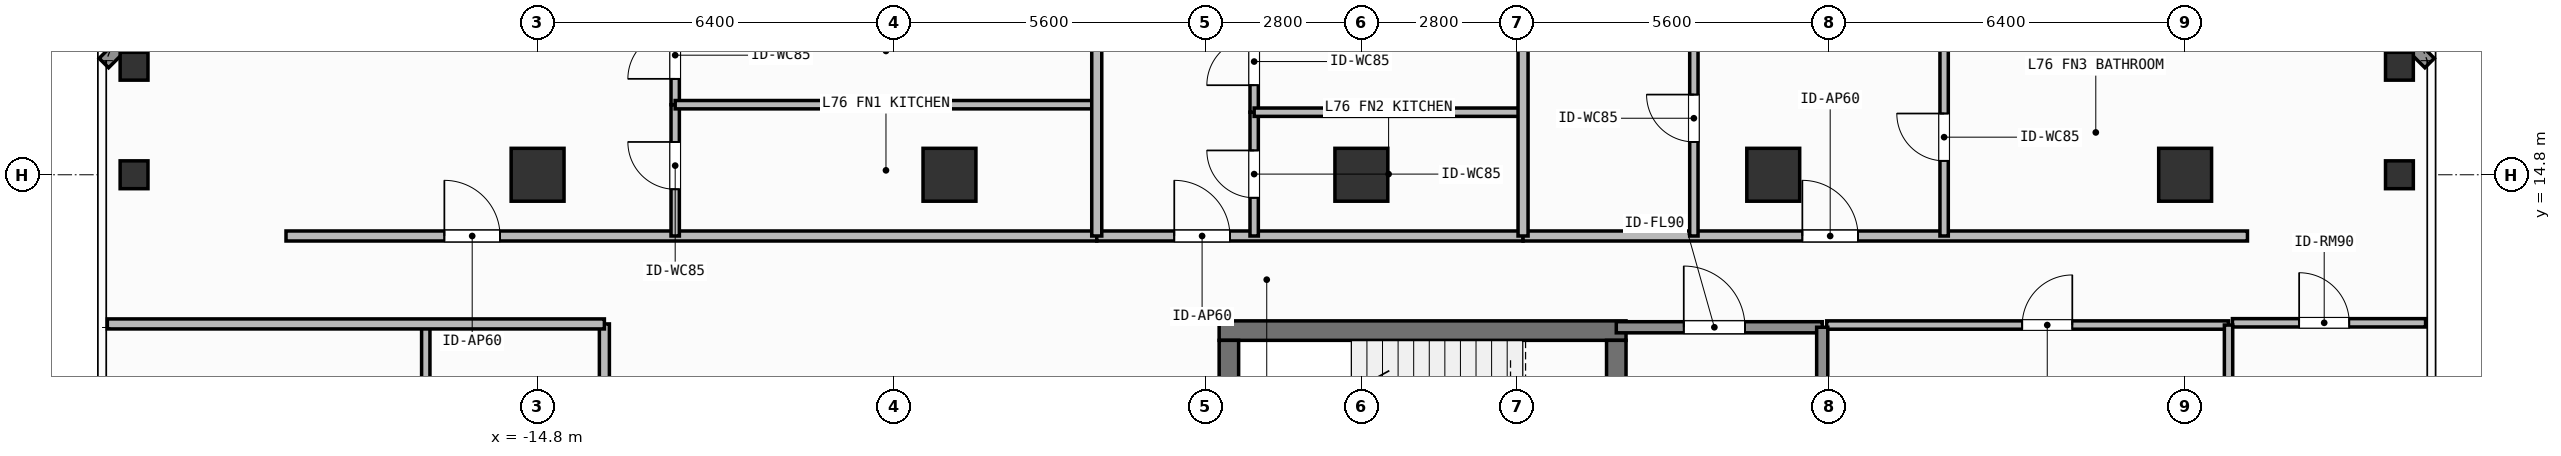
"""IFC4 building model, lengths in metres.
Left out: names, types, materials, properties, quantities, classifications, styles, units other than length and angle.
Written with IfcOpenShell. Run it as: python <this file> out.ifc"""

import sys

from ifc_helpers import new_model, si_unit, direction, frame, frame_2d, origin, origin_2d, place, context, subcontext, project, spatial, rectangle, hollow_rectangle, extrude, element, fill, save


model = new_model("IFC4")
c1 = context("Model", 3, precision=1e-05, world=origin(), true_north=direction((0.0, 1.0)))
c2 = subcontext(c1, "Body", "Model", "MODEL_VIEW")
j1 = project(units=[si_unit("LENGTHUNIT", "METRE"), si_unit("PLANEANGLEUNIT", "RADIAN")], contexts=[c1])
p1 = place(None, origin())
s1 = spatial("IfcSite", under=j1, at=p1, CompositionType="ELEMENT")
p2 = place(p1, origin())
s2 = spatial("IfcBuilding", under=s1, at=p2, CompositionType="ELEMENT")
p3 = place(p2, frame((0.0, 0.0, 309.3)))
s3 = spatial("IfcBuildingStorey", under=s2, at=p3, CompositionType="ELEMENT", Elevation=309.3)
p4 = place(p3, frame((-2.555, 12.0, 0.0), z_axis=(0.0, 0.0, 1.0), x_axis=(1.0, 0.0, 0.0)))
e1 = element("IfcWall", 1, at=p4, inside=s3, PredefinedType="SHEAR", context=c2, shape_type="SweptSolid", body=[
    extrude(rectangle(XDim=7.31, YDim=0.35, at=frame_2d((3.655, 0.0))), origin(), (0.0, 0.0, 1.0), 3.9),
])
p5 = place(p3, frame((-2.38, 8.9, 0.0), z_axis=(0.0, 0.0, 1.0), x_axis=(0.0, 1.0, 0.0)))
e2 = element("IfcWall", 2, at=p5, inside=s3, PredefinedType="SHEAR", context=c2, shape_type="SweptSolid", body=[
    extrude(rectangle(XDim=2.925, YDim=0.35, at=frame_2d((1.462, 0.0))), origin(), (0.0, 0.0, 1.0), 3.9),
])
p6 = place(p3, frame((4.58, 11.825, 0.0), z_axis=(0.0, 0.0, 1.0), x_axis=(0.0, -1.0, 0.0)))
e3 = element("IfcWall", 3, at=p6, inside=s3, PredefinedType="SHEAR", context=c2, shape_type="SweptSolid", body=[
    extrude(rectangle(XDim=2.925, YDim=0.35, at=frame_2d((1.462, 0.0))), origin(), (0.0, 0.0, 1.0), 3.9),
])
p7 = place(p6, frame((0.913, 0.0, 0.0)))
e4 = element("IfcOpeningElement", 4, at=p7, cuts=e3, PredefinedType="OPENING", context=c2, shape_type="SweptSolid", body=[
    extrude(rectangle(XDim=1.1, YDim=2.15, at=frame_2d((0.55, 1.075))), frame((0.0, 0.185, 0.0), z_axis=(0.0, -1.0, 0.0), x_axis=(1.0, 0.0, 0.0)), (0.0, 0.0, 1.0), 0.37),
])
for number, where, z_axis, x_axis in (
    (5, (-14.8, 14.8, 0.0), (0.0, 0.0, 1.0), (1.0, 0.0, 0.0)),
    (6, (-7.4, 14.8, 0.0), (0.0, 0.0, 1.0), (1.0, 0.0, 0.0)),
    (7, (0.0, 14.8, 0.0), (0.0, 0.0, 1.0), (1.0, 0.0, 0.0)),
    (8, (7.4, 14.8, 0.0), (0.0, 0.0, 1.0), (1.0, 0.0, 0.0)),
    (9, (14.8, 14.8, 0.0), (0.0, 0.0, 1.0), (1.0, 0.0, 0.0)),
):
    element("IfcColumn", number, at=place(p3, frame(where, z_axis=z_axis, x_axis=x_axis)), inside=s3, PredefinedType="COLUMN", context=c2, shape_type="SweptSolid", body=[
        extrude(rectangle(XDim=0.95, YDim=0.95, at=origin_2d()), origin(), (0.0, 0.0, 1.0), 3.9),
    ])
for number, where, z_axis, x_axis in (
    (10, (-22.05, 16.75, 0.0), (0.0, 0.0, 1.0), (1.0, 0.0, 0.0)),
    (11, (18.65, 16.75, 0.0), (0.0, 0.0, 1.0), (1.0, 0.0, 0.0)),
    (12, (-22.05, 14.8, 0.0), (0.0, 0.0, 1.0), (1.0, 0.0, 0.0)),
    (13, (18.65, 14.8, 0.0), (0.0, 0.0, 1.0), (1.0, 0.0, 0.0)),
):
    element("IfcColumn", number, at=place(p3, frame(where, z_axis=z_axis, x_axis=x_axis)), inside=s3, PredefinedType="COLUMN", context=c2, shape_type="SweptSolid", body=[
        extrude(hollow_rectangle(XDim=0.5, YDim=0.5, WallThickness=0.025, at=origin_2d()), origin(), (0.0, 0.0, 1.0), 3.9),
    ])
p8 = place(p3, frame((-22.592, 16.808, 0.0), z_axis=(0.0, 0.0, 1.0), x_axis=(0.707106781187, 0.707106781187, 0.0)))
e14 = element("IfcWall", 14, at=p8, inside=s3, PredefinedType="SOLIDWALL", context=c2, shape_type="SweptSolid", body=[
    extrude(rectangle(XDim=6.059, YDim=0.24, at=frame_2d((3.03, 0.0))), origin(), (0.0, 0.0, 1.0), 3.64),
])
p9 = place(p8, frame((2.28, 0.0, 0.8)))
e15 = element("IfcOpeningElement", 15, at=p9, cuts=e14, PredefinedType="OPENING", context=c2, shape_type="SweptSolid", body=[
    extrude(rectangle(XDim=1.5, YDim=1.85, at=frame_2d((0.75, 0.925))), frame((0.0, 0.13, 0.0), z_axis=(0.0, -1.0, 0.0), x_axis=(1.0, 0.0, 0.0)), (0.0, 0.0, 1.0), 0.26),
])
p10 = place(p3, frame((14.908, 21.092, 0.0), z_axis=(0.0, 0.0, 1.0), x_axis=(0.707106781187, -0.707106781187, 0.0)))
e16 = element("IfcWall", 16, at=p10, inside=s3, PredefinedType="SOLIDWALL", context=c2, shape_type="SweptSolid", body=[
    extrude(rectangle(XDim=6.059, YDim=0.24, at=frame_2d((3.03, 0.0))), origin(), (0.0, 0.0, 1.0), 3.64),
])
p11 = place(p10, frame((2.28, 0.0, 0.8)))
e17 = element("IfcOpeningElement", 17, at=p11, cuts=e16, PredefinedType="OPENING", context=c2, shape_type="SweptSolid", body=[
    extrude(rectangle(XDim=1.5, YDim=1.85, at=frame_2d((0.75, 0.925))), frame((0.0, 0.13, 0.0), z_axis=(0.0, -1.0, 0.0), x_axis=(1.0, 0.0, 0.0)), (0.0, 0.0, 1.0), 0.26),
])
p12 = place(p3, frame((4.58, 12.06, 0.0), z_axis=(0.0, 0.0, 1.0), x_axis=(1.0, 0.0, 0.0)))
e18 = element("IfcWall", 18, at=p12, inside=s3, PredefinedType="SOLIDWALL", context=c2, shape_type="SweptSolid", body=[
    extrude(rectangle(XDim=3.7, YDim=0.2, at=frame_2d((1.85, 0.0))), origin(), (0.0, 0.0, 1.0), 3.64),
])
p13 = place(p12, frame((1.212, 0.0, 0.0)))
e19 = element("IfcOpeningElement", 19, at=p13, cuts=e18, PredefinedType="OPENING", context=c2, shape_type="SweptSolid", body=[
    extrude(rectangle(XDim=1.1, YDim=2.15, at=frame_2d((0.55, 1.075))), frame((0.0, 0.11, 0.0), z_axis=(0.0, -1.0, 0.0), x_axis=(1.0, 0.0, 0.0)), (0.0, 0.0, 1.0), 0.22),
])
p14 = place(p3, frame((8.36, 12.1, 0.0), z_axis=(0.0, 0.0, 1.0), x_axis=(1.0, 0.0, 0.0)))
e20 = element("IfcWall", 20, at=p14, inside=s3, PredefinedType="PARTITIONING", context=c2, shape_type="SweptSolid", body=[
    extrude(rectangle(XDim=7.22, YDim=0.15, at=frame_2d((3.61, 0.0))), origin(), (0.0, 0.0, 1.0), 3.64),
])
p15 = place(p14, frame((3.513, 0.0, 0.0)))
e21 = element("IfcOpeningElement", 21, at=p15, cuts=e20, PredefinedType="OPENING", context=c2, shape_type="SweptSolid", body=[
    extrude(rectangle(XDim=0.9, YDim=2.1, at=frame_2d((0.45, 1.05))), frame((0.0, 0.085, 0.0), z_axis=(0.0, -1.0, 0.0), x_axis=(1.0, 0.0, 0.0)), (0.0, 0.0, 1.0), 0.17),
])
p16 = place(p3, frame((-19.32, 13.7, 0.0), z_axis=(0.0, 0.0, 1.0), x_axis=(1.0, 0.0, 0.0)))
e22 = element("IfcWall", 22, at=p16, inside=s3, PredefinedType="PARTITIONING", context=c2, shape_type="SweptSolid", body=[
    extrude(rectangle(XDim=14.566, YDim=0.18, at=frame_2d((7.283, 0.0))), origin(), (0.0, 0.0, 1.0), 3.64),
])
p17 = place(p16, frame((2.845, 0.0, 0.0)))
e23 = element("IfcOpeningElement", 23, at=p17, cuts=e22, PredefinedType="OPENING", context=c2, shape_type="SweptSolid", body=[
    extrude(rectangle(XDim=1.0, YDim=2.2, at=frame_2d((0.5, 1.1))), frame((0.0, 0.1, 0.0), z_axis=(0.0, -1.0, 0.0), x_axis=(1.0, 0.0, 0.0)), (0.0, 0.0, 1.0), 0.2),
])
p18 = place(p3, frame((-12.328, 13.7, 0.0), z_axis=(0.0, 0.0, 1.0), x_axis=(0.0, 1.0, 0.0)))
e24 = element("IfcWall", 24, at=p18, inside=s3, PredefinedType="PARTITIONING", context=c2, shape_type="SweptSolid", body=[
    extrude(rectangle(XDim=2.359, YDim=0.15, at=frame_2d((1.18, 0.0))), origin(), (0.0, 0.0, 1.0), 3.64),
])
p19 = place(p18, frame((0.839, 0.0, 0.0)))
e25 = element("IfcOpeningElement", 25, at=p19, cuts=e24, PredefinedType="OPENING", context=c2, shape_type="SweptSolid", body=[
    extrude(rectangle(XDim=0.85, YDim=2.1, at=frame_2d((0.425, 1.05))), frame((0.0, 0.085, 0.0), z_axis=(0.0, -1.0, 0.0), x_axis=(1.0, 0.0, 0.0)), (0.0, 0.0, 1.0), 0.17),
])
p20 = place(p3, frame((-12.328, 16.059, 0.0), z_axis=(0.0, 0.0, 1.0), x_axis=(0.0, 1.0, 0.0)))
e26 = element("IfcWall", 26, at=p20, inside=s3, PredefinedType="PARTITIONING", context=c2, shape_type="SweptSolid", body=[
    extrude(rectangle(XDim=1.931, YDim=0.15, at=frame_2d((0.965, 0.0))), origin(), (0.0, 0.0, 1.0), 3.64),
])
p21 = place(p20, frame((0.464, 0.0, 0.0)))
e27 = element("IfcOpeningElement", 27, at=p21, cuts=e26, PredefinedType="OPENING", context=c2, shape_type="SweptSolid", body=[
    extrude(rectangle(XDim=0.85, YDim=2.1, at=frame_2d((0.425, 1.05))), frame((0.0, 0.085, 0.0), z_axis=(0.0, -1.0, 0.0), x_axis=(1.0, 0.0, 0.0)), (0.0, 0.0, 1.0), 0.17),
])
p22 = place(p3, frame((-4.754, 13.7, 0.0), z_axis=(0.0, 0.0, 1.0), x_axis=(1.0, 0.0, 0.0)))
e28 = element("IfcWall", 28, at=p22, inside=s3, PredefinedType="PARTITIONING", context=c2, shape_type="SweptSolid", body=[
    extrude(rectangle(XDim=7.659, YDim=0.18, at=frame_2d((3.83, 0.0))), origin(), (0.0, 0.0, 1.0), 3.64),
])
p23 = place(p22, frame((1.393, 0.0, 0.0)))
e29 = element("IfcOpeningElement", 29, at=p23, cuts=e28, PredefinedType="OPENING", context=c2, shape_type="SweptSolid", body=[
    extrude(rectangle(XDim=1.0, YDim=2.2, at=frame_2d((0.5, 1.1))), frame((0.0, 0.1, 0.0), z_axis=(0.0, -1.0, 0.0), x_axis=(1.0, 0.0, 0.0)), (0.0, 0.0, 1.0), 0.2),
])
p24 = place(p3, frame((-1.926, 13.7, 0.0), z_axis=(0.0, 0.0, 1.0), x_axis=(0.0, 1.0, 0.0)))
e30 = element("IfcWall", 30, at=p24, inside=s3, PredefinedType="PARTITIONING", context=c2, shape_type="SweptSolid", body=[
    extrude(rectangle(XDim=2.224, YDim=0.15, at=frame_2d((1.112, 0.0))), origin(), (0.0, 0.0, 1.0), 3.64),
])
p25 = place(p24, frame((0.687, 0.0, 0.0)))
e31 = element("IfcOpeningElement", 31, at=p25, cuts=e30, PredefinedType="OPENING", context=c2, shape_type="SweptSolid", body=[
    extrude(rectangle(XDim=0.85, YDim=2.1, at=frame_2d((0.425, 1.05))), frame((0.0, 0.085, 0.0), z_axis=(0.0, -1.0, 0.0), x_axis=(1.0, 0.0, 0.0)), (0.0, 0.0, 1.0), 0.17),
])
p26 = place(p3, frame((-1.926, 15.924, 0.0), z_axis=(0.0, 0.0, 1.0), x_axis=(0.0, 1.0, 0.0)))
e32 = element("IfcWall", 32, at=p26, inside=s3, PredefinedType="PARTITIONING", context=c2, shape_type="SweptSolid", body=[
    extrude(rectangle(XDim=1.82, YDim=0.15, at=frame_2d((0.91, 0.0))), origin(), (0.0, 0.0, 1.0), 3.64),
])
p27 = place(p26, frame((0.485, 0.0, 0.0)))
e33 = element("IfcOpeningElement", 33, at=p27, cuts=e32, PredefinedType="OPENING", context=c2, shape_type="SweptSolid", body=[
    extrude(rectangle(XDim=0.85, YDim=2.1, at=frame_2d((0.425, 1.05))), frame((0.0, 0.085, 0.0), z_axis=(0.0, -1.0, 0.0), x_axis=(1.0, 0.0, 0.0)), (0.0, 0.0, 1.0), 0.17),
])
p28 = place(p3, frame((2.905, 13.7, 0.0), z_axis=(0.0, 0.0, 1.0), x_axis=(1.0, 0.0, 0.0)))
e34 = element("IfcWall", 34, at=p28, inside=s3, PredefinedType="PARTITIONING", context=c2, shape_type="SweptSolid", body=[
    extrude(rectangle(XDim=13.015, YDim=0.18, at=frame_2d((6.507, 0.0))), origin(), (0.0, 0.0, 1.0), 3.64),
])
p29 = place(p28, frame((5.018, 0.0, 0.0)))
e35 = element("IfcOpeningElement", 35, at=p29, cuts=e34, PredefinedType="OPENING", context=c2, shape_type="SweptSolid", body=[
    extrude(rectangle(XDim=1.0, YDim=2.2, at=frame_2d((0.5, 1.1))), frame((0.0, 0.1, 0.0), z_axis=(0.0, -1.0, 0.0), x_axis=(1.0, 0.0, 0.0)), (0.0, 0.0, 1.0), 0.2),
])
p30 = place(p3, frame((5.974, 13.7, 0.0), z_axis=(0.0, 0.0, 1.0), x_axis=(0.0, 1.0, 0.0)))
e36 = element("IfcWall", 36, at=p30, inside=s3, PredefinedType="PARTITIONING", context=c2, shape_type="SweptSolid", body=[
    extrude(rectangle(XDim=3.721, YDim=0.15, at=frame_2d((1.86, 0.0))), origin(), (0.0, 0.0, 1.0), 3.64),
])
p31 = place(p30, frame((1.691, 0.0, 0.0)))
e37 = element("IfcOpeningElement", 37, at=p31, cuts=e36, PredefinedType="OPENING", context=c2, shape_type="SweptSolid", body=[
    extrude(rectangle(XDim=0.85, YDim=2.1, at=frame_2d((0.425, 1.05))), frame((0.0, 0.085, 0.0), z_axis=(0.0, -1.0, 0.0), x_axis=(1.0, 0.0, 0.0)), (0.0, 0.0, 1.0), 0.17),
])
p32 = place(p3, frame((10.47, 13.7, 0.0), z_axis=(0.0, 0.0, 1.0), x_axis=(0.0, 1.0, 0.0)))
e38 = element("IfcWall", 38, at=p32, inside=s3, PredefinedType="PARTITIONING", context=c2, shape_type="SweptSolid", body=[
    extrude(rectangle(XDim=3.721, YDim=0.15, at=frame_2d((1.86, 0.0))), origin(), (0.0, 0.0, 1.0), 3.64),
])
p33 = place(p32, frame((1.351, 0.0, 0.0)))
e39 = element("IfcOpeningElement", 39, at=p33, cuts=e38, PredefinedType="OPENING", context=c2, shape_type="SweptSolid", body=[
    extrude(rectangle(XDim=0.85, YDim=2.1, at=frame_2d((0.425, 1.05))), frame((0.0, 0.085, 0.0), z_axis=(0.0, -1.0, 0.0), x_axis=(1.0, 0.0, 0.0)), (0.0, 0.0, 1.0), 0.17),
])
p34 = place(p3, frame((-13.6, 1.164, 0.0), z_axis=(0.0, 0.0, 1.0), x_axis=(0.0, 1.0, 0.0)))
e40 = element("IfcWall", 40, at=p34, inside=s3, PredefinedType="PARTITIONING", context=c2, shape_type="SweptSolid", body=[
    extrude(rectangle(XDim=10.956, YDim=0.18, at=frame_2d((5.478, 0.0))), origin(), (0.0, 0.0, 1.0), 3.64),
])
p35 = place(p34, frame((4.621, 0.0, 0.0)))
e41 = element("IfcOpeningElement", 41, at=p35, cuts=e40, PredefinedType="OPENING", context=c2, shape_type="SweptSolid", body=[
    extrude(rectangle(XDim=1.0, YDim=2.2, at=frame_2d((0.5, 1.1))), frame((0.0, 0.1, 0.0), z_axis=(0.0, -1.0, 0.0), x_axis=(1.0, 0.0, 0.0)), (0.0, 0.0, 1.0), 0.2),
])
p36 = place(p3, frame((15.65, 12.14, 0.0), z_axis=(0.0, 0.0, 1.0), x_axis=(1.0, 0.0, 0.0)))
e42 = element("IfcWall", 42, at=p36, inside=s3, PredefinedType="PARTITIONING", context=c2, shape_type="SweptSolid", body=[
    extrude(rectangle(XDim=3.47, YDim=0.15, at=frame_2d((1.735, 0.0))), origin(), (0.0, 0.0, 1.0), 3.64),
])
p37 = place(p36, frame((1.198, 0.0, 0.0)))
e43 = element("IfcOpeningElement", 43, at=p37, cuts=e42, PredefinedType="OPENING", context=c2, shape_type="SweptSolid", body=[
    extrude(rectangle(XDim=0.9, YDim=2.1, at=frame_2d((0.45, 1.05))), frame((0.0, 0.085, 0.0), z_axis=(0.0, -1.0, 0.0), x_axis=(1.0, 0.0, 0.0)), (0.0, 0.0, 1.0), 0.17),
])
p38 = place(p3, frame((8.28, 8.725, 0.0), z_axis=(0.0, 0.0, 1.0), x_axis=(0.0, 1.0, 0.0)))
e44 = element("IfcWall", 44, at=p38, inside=s3, PredefinedType="SOLIDWALL", context=c2, shape_type="SweptSolid", body=[
    extrude(rectangle(XDim=3.335, YDim=0.2, at=frame_2d((1.667, 0.0))), origin(), (0.0, 0.0, 1.0), 3.64),
])
p39 = place(p3, frame((15.58, 5.85, 0.0), z_axis=(0.0, 0.0, 1.0), x_axis=(0.0, 1.0, 0.0)))
e45 = element("IfcWall", 45, at=p39, inside=s3, PredefinedType="PARTITIONING", context=c2, shape_type="SweptSolid", body=[
    extrude(rectangle(XDim=6.25, YDim=0.15, at=frame_2d((3.125, 0.0))), origin(), (0.0, 0.0, 1.0), 3.33),
])
p40 = place(p3, frame((-12.328, 16.059, 0.0), z_axis=(0.0, 0.0, 1.0), x_axis=(1.0, 0.0, 0.0)))
e46 = element("IfcWall", 46, at=p40, inside=s3, PredefinedType="PARTITIONING", context=c2, shape_type="SweptSolid", body=[
    extrude(rectangle(XDim=7.574, YDim=0.15, at=frame_2d((3.787, 0.0))), origin(), (0.0, 0.0, 1.0), 3.64),
])
p41 = place(p3, frame((-1.926, 15.924, 0.0), z_axis=(0.0, 0.0, 1.0), x_axis=(1.0, 0.0, 0.0)))
e47 = element("IfcWall", 47, at=p41, inside=s3, PredefinedType="PARTITIONING", context=c2, shape_type="SweptSolid", body=[
    extrude(rectangle(XDim=4.831, YDim=0.15, at=frame_2d((2.416, 0.0))), origin(), (0.0, 0.0, 1.0), 3.64),
])
for number, where, z_axis, x_axis in (
    (48, (-4.754, 13.7, 0.0), (0.0, 0.0, 1.0), (0.0, 1.0, 0.0)),
    (49, (2.905, 13.7, 0.0), (0.0, 0.0, 1.0), (0.0, 1.0, 0.0)),
):
    element("IfcWall", number, at=place(p3, frame(where, z_axis=z_axis, x_axis=x_axis)), inside=s3, PredefinedType="PARTITIONING", context=c2, shape_type="SweptSolid", body=[
        extrude(rectangle(XDim=7.33, YDim=0.18, at=frame_2d((3.665, 0.0))), origin(), (0.0, 0.0, 1.0), 3.64),
    ])
p42 = place(p3, frame((-16.809, 9.32, 0.0), z_axis=(0.0, 0.0, 1.0), x_axis=(0.0, 1.0, 0.0)))
e50 = element("IfcWall", 50, at=p42, inside=s3, PredefinedType="PARTITIONING", context=c2, shape_type="SweptSolid", body=[
    extrude(rectangle(XDim=2.8, YDim=0.15, at=frame_2d((1.4, 0.0))), origin(), (0.0, 0.0, 1.0), 3.64),
])
p43 = place(p3, frame((-22.53, 12.12, 0.0), z_axis=(0.0, 0.0, 1.0), x_axis=(1.0, 0.0, 0.0)))
e51 = element("IfcWall", 51, at=p43, inside=s3, PredefinedType="PARTITIONING", context=c2, shape_type="SweptSolid", body=[
    extrude(rectangle(XDim=8.93, YDim=0.18, at=frame_2d((4.465, 0.0))), origin(), (0.0, 0.0, 1.0), 3.64),
])
p44 = place(p13, origin())
e52 = element("IfcDoor", 52, at=p44, inside=s3, OperationType="SINGLE_SWING_LEFT", PredefinedType="DOOR", context=c2, shape_type="SweptSolid", body=[
    extrude(rectangle(XDim=1.1, YDim=2.15, at=frame_2d((0.55, 1.075))), frame((0.0, 0.025, 0.0), z_axis=(0.0, -1.0, 0.0), x_axis=(1.0, 0.0, 0.0)), (0.0, 0.0, 1.0), 0.05),
])
fill(e19, e52)
p45 = place(p15, origin())
e53 = element("IfcDoor", 53, at=p45, inside=s3, OperationType="SINGLE_SWING_RIGHT", PredefinedType="DOOR", context=c2, shape_type="SweptSolid", body=[
    extrude(rectangle(XDim=0.9, YDim=2.1, at=frame_2d((0.45, 1.05))), frame((0.0, 0.025, 0.0), z_axis=(0.0, -1.0, 0.0), x_axis=(1.0, 0.0, 0.0)), (0.0, 0.0, 1.0), 0.05),
])
fill(e21, e53)
p46 = place(p17, origin())
e54 = element("IfcDoor", 54, at=p46, inside=s3, OperationType="SINGLE_SWING_LEFT", PredefinedType="DOOR", context=c2, shape_type="SweptSolid", body=[
    extrude(rectangle(XDim=1.0, YDim=2.2, at=frame_2d((0.5, 1.1))), frame((0.0, 0.025, 0.0), z_axis=(0.0, -1.0, 0.0), x_axis=(1.0, 0.0, 0.0)), (0.0, 0.0, 1.0), 0.05),
])
fill(e23, e54)
p47 = place(p19, origin())
e55 = element("IfcDoor", 55, at=p47, inside=s3, OperationType="SINGLE_SWING_RIGHT", PredefinedType="DOOR", context=c2, shape_type="SweptSolid", body=[
    extrude(rectangle(XDim=0.85, YDim=2.1, at=frame_2d((0.425, 1.05))), frame((0.0, 0.025, 0.0), z_axis=(0.0, -1.0, 0.0), x_axis=(1.0, 0.0, 0.0)), (0.0, 0.0, 1.0), 0.05),
])
fill(e25, e55)
p48 = place(p21, origin())
e56 = element("IfcDoor", 56, at=p48, inside=s3, OperationType="SINGLE_SWING_LEFT", PredefinedType="DOOR", context=c2, shape_type="SweptSolid", body=[
    extrude(rectangle(XDim=0.85, YDim=2.1, at=frame_2d((0.425, 1.05))), frame((0.0, 0.025, 0.0), z_axis=(0.0, -1.0, 0.0), x_axis=(1.0, 0.0, 0.0)), (0.0, 0.0, 1.0), 0.05),
])
fill(e27, e56)
p49 = place(p23, origin())
e57 = element("IfcDoor", 57, at=p49, inside=s3, OperationType="SINGLE_SWING_LEFT", PredefinedType="DOOR", context=c2, shape_type="SweptSolid", body=[
    extrude(rectangle(XDim=1.0, YDim=2.2, at=frame_2d((0.5, 1.1))), frame((0.0, 0.025, 0.0), z_axis=(0.0, -1.0, 0.0), x_axis=(1.0, 0.0, 0.0)), (0.0, 0.0, 1.0), 0.05),
])
fill(e29, e57)
p50 = place(p25, origin())
e58 = element("IfcDoor", 58, at=p50, inside=s3, OperationType="SINGLE_SWING_RIGHT", PredefinedType="DOOR", context=c2, shape_type="SweptSolid", body=[
    extrude(rectangle(XDim=0.85, YDim=2.1, at=frame_2d((0.425, 1.05))), frame((0.0, 0.025, 0.0), z_axis=(0.0, -1.0, 0.0), x_axis=(1.0, 0.0, 0.0)), (0.0, 0.0, 1.0), 0.05),
])
fill(e31, e58)
p51 = place(p27, origin())
e59 = element("IfcDoor", 59, at=p51, inside=s3, OperationType="SINGLE_SWING_LEFT", PredefinedType="DOOR", context=c2, shape_type="SweptSolid", body=[
    extrude(rectangle(XDim=0.85, YDim=2.1, at=frame_2d((0.425, 1.05))), frame((0.0, 0.025, 0.0), z_axis=(0.0, -1.0, 0.0), x_axis=(1.0, 0.0, 0.0)), (0.0, 0.0, 1.0), 0.05),
])
fill(e33, e59)
p52 = place(p29, origin())
e60 = element("IfcDoor", 60, at=p52, inside=s3, OperationType="SINGLE_SWING_LEFT", PredefinedType="DOOR", context=c2, shape_type="SweptSolid", body=[
    extrude(rectangle(XDim=1.0, YDim=2.2, at=frame_2d((0.5, 1.1))), frame((0.0, 0.025, 0.0), z_axis=(0.0, -1.0, 0.0), x_axis=(1.0, 0.0, 0.0)), (0.0, 0.0, 1.0), 0.05),
])
fill(e35, e60)
p53 = place(p31, origin())
e61 = element("IfcDoor", 61, at=p53, inside=s3, OperationType="SINGLE_SWING_RIGHT", PredefinedType="DOOR", context=c2, shape_type="SweptSolid", body=[
    extrude(rectangle(XDim=0.85, YDim=2.1, at=frame_2d((0.425, 1.05))), frame((0.0, 0.025, 0.0), z_axis=(0.0, -1.0, 0.0), x_axis=(1.0, 0.0, 0.0)), (0.0, 0.0, 1.0), 0.05),
])
fill(e37, e61)
p54 = place(p33, origin())
e62 = element("IfcDoor", 62, at=p54, inside=s3, OperationType="SINGLE_SWING_RIGHT", PredefinedType="DOOR", context=c2, shape_type="SweptSolid", body=[
    extrude(rectangle(XDim=0.85, YDim=2.1, at=frame_2d((0.425, 1.05))), frame((0.0, 0.025, 0.0), z_axis=(0.0, -1.0, 0.0), x_axis=(1.0, 0.0, 0.0)), (0.0, 0.0, 1.0), 0.05),
])
fill(e39, e62)
p55 = place(p37, origin())
e63 = element("IfcDoor", 63, at=p55, inside=s3, OperationType="SINGLE_SWING_LEFT", PredefinedType="DOOR", context=c2, shape_type="SweptSolid", body=[
    extrude(rectangle(XDim=0.9, YDim=2.1, at=frame_2d((0.45, 1.05))), frame((0.0, 0.025, 0.0), z_axis=(0.0, -1.0, 0.0), x_axis=(1.0, 0.0, 0.0)), (0.0, 0.0, 1.0), 0.05),
])
fill(e43, e63)
save(model, sys.argv[1])
